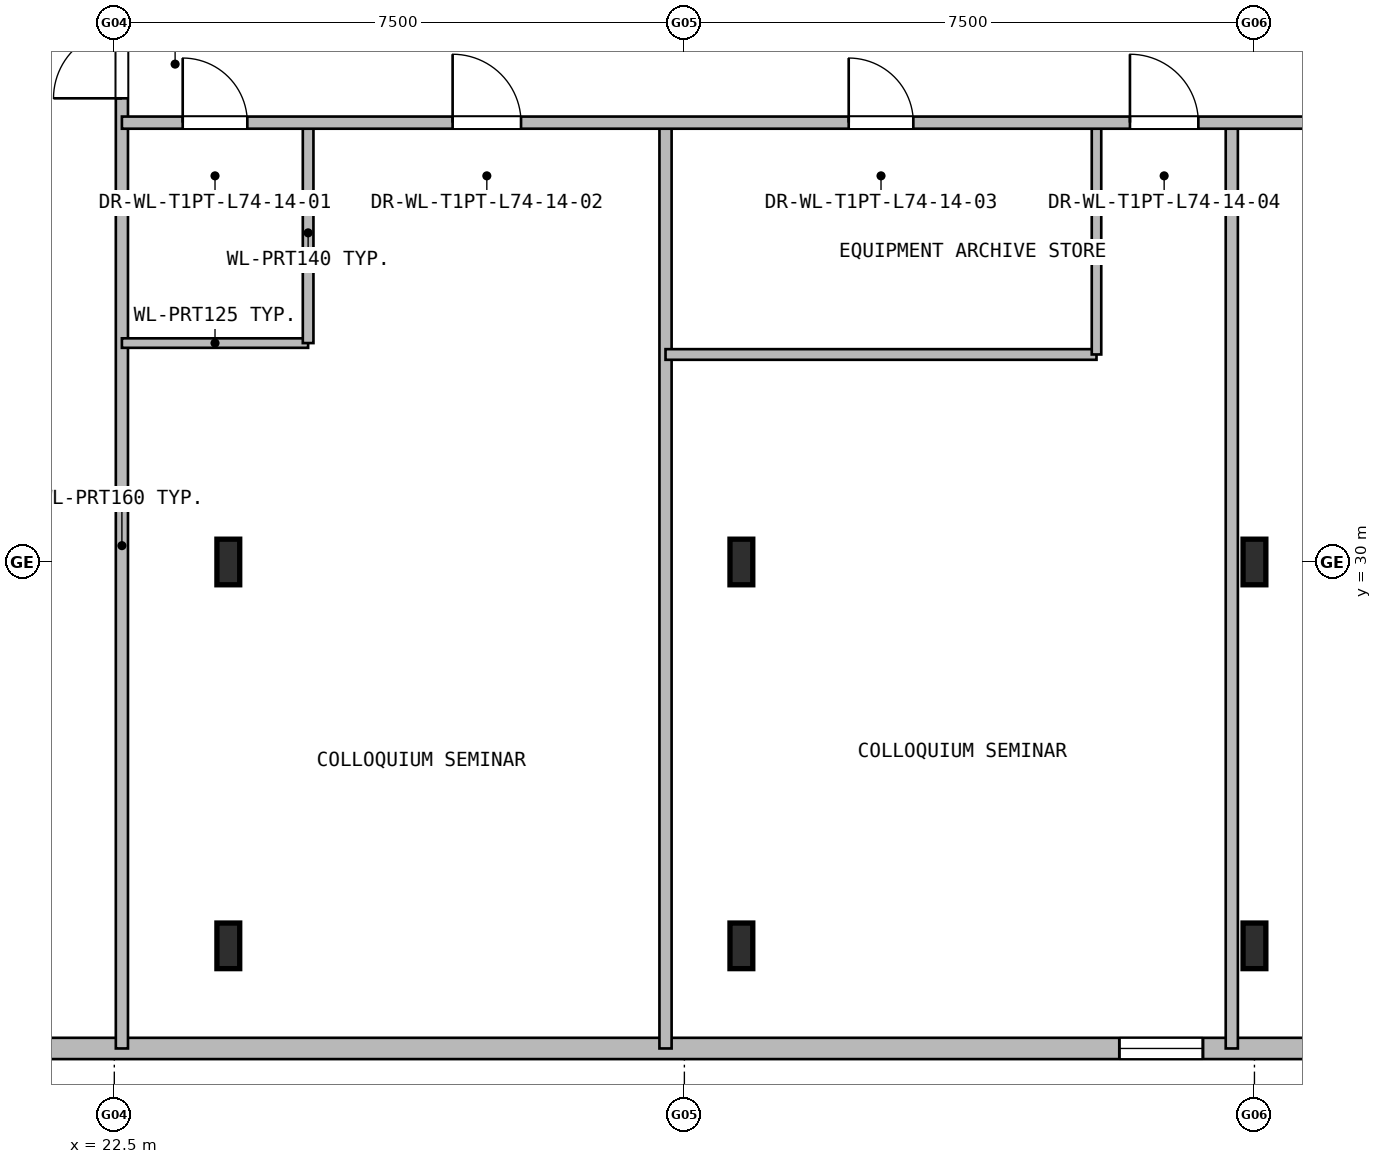
"""IFC4 building model, lengths in metres.
Left out: names, types, materials, properties, quantities, classifications, styles, units other than length and angle.
Written with IfcOpenShell. Run it as: python <this file> out.ifc"""

import sys

from ifc_helpers import new_model, si_unit, direction, frame, frame_2d, origin, origin_2d, place, context, subcontext, project, spatial, rectangle, i_section, extrude, element, fill, save


model = new_model("IFC4")
c1 = context("Model", 3, precision=1e-05, world=origin(), true_north=direction((0.0, 1.0)))
c2 = subcontext(c1, "Body", "Model", "MODEL_VIEW")
j1 = project(units=[si_unit("LENGTHUNIT", "METRE"), si_unit("PLANEANGLEUNIT", "RADIAN")], contexts=[c1])
p1 = place(None, origin())
s1 = spatial("IfcSite", under=j1, at=p1, CompositionType="ELEMENT")
p2 = place(p1, origin())
s2 = spatial("IfcBuilding", under=s1, at=p2, CompositionType="ELEMENT")
p3 = place(p2, frame((0.0, 0.0, 265.8)))
s3 = spatial("IfcBuildingStorey", under=s2, at=p3, CompositionType="ELEMENT", Elevation=265.8)
for number, where, z_axis, x_axis in (
    (1, (24.0, 24.95, 0.0), (0.0, 0.0, 1.0), (1.0, 0.0, 0.0)),
    (2, (24.0, 30.0, 0.0), (0.0, 0.0, 1.0), (1.0, 0.0, 0.0)),
    (3, (30.75, 24.95, 0.0), (0.0, 0.0, 1.0), (1.0, 0.0, 0.0)),
    (4, (30.75, 30.0, 0.0), (0.0, 0.0, 1.0), (1.0, 0.0, 0.0)),
    (5, (37.5, 24.95, 0.0), (0.0, 0.0, 1.0), (1.0, 0.0, 0.0)),
    (6, (37.5, 30.0, 0.0), (0.0, 0.0, 1.0), (1.0, 0.0, 0.0)),
):
    element("IfcColumn", number, at=place(p3, frame(where, z_axis=z_axis, x_axis=x_axis)), inside=s3, PredefinedType="COLUMN", context=c2, shape_type="SweptSolid", body=[
        extrude(i_section(OverallWidth=0.3, OverallDepth=0.6, WebThickness=0.014, FlangeThickness=0.025, at=origin_2d()), origin(), (0.0, 0.0, 1.0), 4.2),
    ])
p4 = place(p3, frame((54.55, 23.6, 0.0), z_axis=(0.0, 0.0, 1.0), x_axis=(-1.0, 0.0, 0.0)))
e7 = element("IfcWall", 7, at=p4, inside=s3, PredefinedType="SOLIDWALL", context=c2, shape_type="SweptSolid", body=[
    extrude(rectangle(XDim=34.1, YDim=0.28, at=frame_2d((17.05, 0.0))), origin(), (0.0, 0.0, 1.0), 3.93),
])
p5 = place(p4, frame((17.728, 0.0, 0.8)))
e8 = element("IfcOpeningElement", 8, at=p5, cuts=e7, PredefinedType="OPENING", context=c2, shape_type="SweptSolid", body=[
    extrude(rectangle(XDim=1.1, YDim=1.5, at=frame_2d((0.55, 0.75))), frame((0.0, 0.15, 0.0), z_axis=(0.0, -1.0, 0.0), x_axis=(1.0, 0.0, 0.0)), (0.0, 0.0, 1.0), 0.3),
])
p6 = place(p4, frame((15.279, 0.0, 0.8)))
e9 = element("IfcOpeningElement", 9, at=p6, cuts=e7, PredefinedType="OPENING", context=c2, shape_type="SweptSolid", body=[
    extrude(rectangle(XDim=1.1, YDim=1.5, at=frame_2d((0.55, 0.75))), frame((0.0, 0.15, 0.0), z_axis=(0.0, -1.0, 0.0), x_axis=(1.0, 0.0, 0.0)), (0.0, 0.0, 1.0), 0.3),
])
p7 = place(p3, frame((22.6, 23.6, 0.0), z_axis=(0.0, 0.0, 1.0), x_axis=(0.0, 1.0, 0.0)))
e10 = element("IfcWall", 10, at=p7, inside=s3, PredefinedType="PARTITIONING", context=c2, shape_type="SweptSolid", body=[
    extrude(rectangle(XDim=14.6, YDim=0.16, at=frame_2d((7.3, 0.0))), origin(), (0.0, 0.0, 1.0), 3.93),
])
p8 = place(p7, frame((12.5, 0.0, 0.0)))
e11 = element("IfcOpeningElement", 11, at=p8, cuts=e10, PredefinedType="OPENING", context=c2, shape_type="SweptSolid", body=[
    extrude(rectangle(XDim=0.9, YDim=2.05, at=frame_2d((0.45, 1.025))), frame((0.0, 0.09, 0.0), z_axis=(0.0, -1.0, 0.0), x_axis=(1.0, 0.0, 0.0)), (0.0, 0.0, 1.0), 0.18),
])
p9 = place(p3, frame((22.6, 32.88, 0.0), z_axis=(0.0, 0.0, 1.0), x_axis=(1.0, 0.0, 0.0)))
e12 = element("IfcWall", 12, at=p9, inside=s3, PredefinedType="PARTITIONING", context=c2, shape_type="SweptSolid", body=[
    extrude(rectangle(XDim=2.45, YDim=0.125, at=frame_2d((1.225, 0.0))), origin(), (0.0, 0.0, 1.0), 3.93),
])
p10 = place(p3, frame((25.05, 32.88, 0.0), z_axis=(0.0, 0.0, 1.0), x_axis=(0.0, 1.0, 0.0)))
e13 = element("IfcWall", 13, at=p10, inside=s3, PredefinedType="PARTITIONING", context=c2, shape_type="SweptSolid", body=[
    extrude(rectangle(XDim=2.9, YDim=0.14, at=frame_2d((1.45, 0.0))), origin(), (0.0, 0.0, 1.0), 3.93),
])
p11 = place(p3, frame((29.752, 23.6, 0.0), z_axis=(0.0, 0.0, 1.0), x_axis=(0.0, 1.0, 0.0)))
e14 = element("IfcWall", 14, at=p11, inside=s3, PredefinedType="PARTITIONING", context=c2, shape_type="SweptSolid", body=[
    extrude(rectangle(XDim=12.18, YDim=0.16, at=frame_2d((6.09, 0.0))), origin(), (0.0, 0.0, 1.0), 3.93),
])
p12 = place(p3, frame((29.752, 32.73, 0.0), z_axis=(0.0, 0.0, 1.0), x_axis=(1.0, 0.0, 0.0)))
e15 = element("IfcWall", 15, at=p12, inside=s3, PredefinedType="PARTITIONING", context=c2, shape_type="SweptSolid", body=[
    extrude(rectangle(XDim=5.67, YDim=0.14, at=frame_2d((2.835, 0.0))), origin(), (0.0, 0.0, 1.0), 3.93),
])
p13 = place(p3, frame((35.422, 32.73, 0.0), z_axis=(0.0, 0.0, 1.0), x_axis=(0.0, 1.0, 0.0)))
e16 = element("IfcWall", 16, at=p13, inside=s3, PredefinedType="PARTITIONING", context=c2, shape_type="SweptSolid", body=[
    extrude(rectangle(XDim=3.05, YDim=0.125, at=frame_2d((1.525, 0.0))), origin(), (0.0, 0.0, 1.0), 3.93),
])
p14 = place(p3, frame((37.202, 23.6, 0.0), z_axis=(0.0, 0.0, 1.0), x_axis=(0.0, 1.0, 0.0)))
e17 = element("IfcWall", 17, at=p14, inside=s3, PredefinedType="PARTITIONING", context=c2, shape_type="SweptSolid", body=[
    extrude(rectangle(XDim=12.18, YDim=0.16, at=frame_2d((6.09, 0.0))), origin(), (0.0, 0.0, 1.0), 3.93),
])
p15 = place(p3, frame((22.6, 35.78, 0.0), z_axis=(0.0, 0.0, 1.0), x_axis=(1.0, 0.0, 0.0)))
e18 = element("IfcWall", 18, at=p15, inside=s3, PredefinedType="PARTITIONING", context=c2, shape_type="SweptSolid", body=[
    extrude(rectangle(XDim=29.8, YDim=0.16, at=frame_2d((14.9, 0.0))), origin(), (0.0, 0.0, 1.0), 3.93),
])
p16 = place(p15, frame((0.8, 0.0, 0.0)))
e19 = element("IfcOpeningElement", 19, at=p16, cuts=e18, PredefinedType="OPENING", context=c2, shape_type="SweptSolid", body=[
    extrude(rectangle(XDim=0.85, YDim=2.05, at=frame_2d((0.425, 1.025))), frame((0.0, 0.09, 0.0), z_axis=(0.0, -1.0, 0.0), x_axis=(1.0, 0.0, 0.0)), (0.0, 0.0, 1.0), 0.18),
])
p17 = place(p15, frame((4.351, 0.0, 0.0)))
e20 = element("IfcOpeningElement", 20, at=p17, cuts=e18, PredefinedType="OPENING", context=c2, shape_type="SweptSolid", body=[
    extrude(rectangle(XDim=0.9, YDim=2.05, at=frame_2d((0.45, 1.025))), frame((0.0, 0.09, 0.0), z_axis=(0.0, -1.0, 0.0), x_axis=(1.0, 0.0, 0.0)), (0.0, 0.0, 1.0), 0.18),
])
p18 = place(p15, frame((9.562, 0.0, 0.0)))
e21 = element("IfcOpeningElement", 21, at=p18, cuts=e18, PredefinedType="OPENING", context=c2, shape_type="SweptSolid", body=[
    extrude(rectangle(XDim=0.85, YDim=2.05, at=frame_2d((0.425, 1.025))), frame((0.0, 0.09, 0.0), z_axis=(0.0, -1.0, 0.0), x_axis=(1.0, 0.0, 0.0)), (0.0, 0.0, 1.0), 0.18),
])
p19 = place(p15, frame((13.262, 0.0, 0.0)))
e22 = element("IfcOpeningElement", 22, at=p19, cuts=e18, PredefinedType="OPENING", context=c2, shape_type="SweptSolid", body=[
    extrude(rectangle(XDim=0.9, YDim=2.05, at=frame_2d((0.45, 1.025))), frame((0.0, 0.09, 0.0), z_axis=(0.0, -1.0, 0.0), x_axis=(1.0, 0.0, 0.0)), (0.0, 0.0, 1.0), 0.18),
])
p20 = place(p15, frame((18.001, 0.0, 0.0)))
e23 = element("IfcOpeningElement", 23, at=p20, cuts=e18, PredefinedType="OPENING", context=c2, shape_type="SweptSolid", body=[
    extrude(rectangle(XDim=0.95, YDim=2.1, at=frame_2d((0.475, 1.05))), frame((0.0, 0.09, 0.0), z_axis=(0.0, -1.0, 0.0), x_axis=(1.0, 0.0, 0.0)), (0.0, 0.0, 1.0), 0.18),
])
p21 = place(p15, frame((26.54, 0.0, 0.0)))
e24 = element("IfcOpeningElement", 24, at=p21, cuts=e18, PredefinedType="OPENING", context=c2, shape_type="SweptSolid", body=[
    extrude(rectangle(XDim=0.85, YDim=2.05, at=frame_2d((0.425, 1.025))), frame((0.0, 0.09, 0.0), z_axis=(0.0, -1.0, 0.0), x_axis=(1.0, 0.0, 0.0)), (0.0, 0.0, 1.0), 0.18),
])
p22 = place(p15, frame((22.79, 0.0, 0.0)))
e25 = element("IfcOpeningElement", 25, at=p22, cuts=e18, PredefinedType="OPENING", context=c2, shape_type="SweptSolid", body=[
    extrude(rectangle(XDim=0.9, YDim=2.05, at=frame_2d((0.45, 1.025))), frame((0.0, 0.09, 0.0), z_axis=(0.0, -1.0, 0.0), x_axis=(1.0, 0.0, 0.0)), (0.0, 0.0, 1.0), 0.18),
])
p23 = place(p5, origin())
e26 = element("IfcWindow", 26, at=p23, inside=s3, PartitioningType="SINGLE_PANEL", PredefinedType="WINDOW", context=c2, shape_type="SweptSolid", body=[
    extrude(rectangle(XDim=1.1, YDim=1.5, at=frame_2d((0.55, 0.75))), frame((0.0, 0.03, 0.0), z_axis=(0.0, -1.0, 0.0), x_axis=(1.0, 0.0, 0.0)), (0.0, 0.0, 1.0), 0.06),
])
fill(e8, e26)
p24 = place(p8, origin())
e27 = element("IfcDoor", 27, at=p24, inside=s3, OperationType="SINGLE_SWING_RIGHT", PredefinedType="DOOR", context=c2, shape_type="SweptSolid", body=[
    extrude(rectangle(XDim=0.9, YDim=2.05, at=frame_2d((0.45, 1.025))), frame((0.0, 0.025, 0.0), z_axis=(0.0, -1.0, 0.0), x_axis=(1.0, 0.0, 0.0)), (0.0, 0.0, 1.0), 0.05),
])
fill(e11, e27)
p25 = place(p16, origin())
e28 = element("IfcDoor", 28, at=p25, inside=s3, OperationType="SINGLE_SWING_RIGHT", PredefinedType="DOOR", context=c2, shape_type="SweptSolid", body=[
    extrude(rectangle(XDim=0.85, YDim=2.05, at=frame_2d((0.425, 1.025))), frame((0.0, 0.025, 0.0), z_axis=(0.0, -1.0, 0.0), x_axis=(1.0, 0.0, 0.0)), (0.0, 0.0, 1.0), 0.05),
])
fill(e19, e28)
p26 = place(p17, origin())
e29 = element("IfcDoor", 29, at=p26, inside=s3, OperationType="SINGLE_SWING_LEFT", PredefinedType="DOOR", context=c2, shape_type="SweptSolid", body=[
    extrude(rectangle(XDim=0.9, YDim=2.05, at=frame_2d((0.45, 1.025))), frame((0.0, 0.025, 0.0), z_axis=(0.0, -1.0, 0.0), x_axis=(1.0, 0.0, 0.0)), (0.0, 0.0, 1.0), 0.05),
])
fill(e20, e29)
p27 = place(p18, origin())
e30 = element("IfcDoor", 30, at=p27, inside=s3, OperationType="SINGLE_SWING_RIGHT", PredefinedType="DOOR", context=c2, shape_type="SweptSolid", body=[
    extrude(rectangle(XDim=0.85, YDim=2.05, at=frame_2d((0.425, 1.025))), frame((0.0, 0.025, 0.0), z_axis=(0.0, -1.0, 0.0), x_axis=(1.0, 0.0, 0.0)), (0.0, 0.0, 1.0), 0.05),
])
fill(e21, e30)
p28 = place(p19, origin())
e31 = element("IfcDoor", 31, at=p28, inside=s3, OperationType="SINGLE_SWING_LEFT", PredefinedType="DOOR", context=c2, shape_type="SweptSolid", body=[
    extrude(rectangle(XDim=0.9, YDim=2.05, at=frame_2d((0.45, 1.025))), frame((0.0, 0.025, 0.0), z_axis=(0.0, -1.0, 0.0), x_axis=(1.0, 0.0, 0.0)), (0.0, 0.0, 1.0), 0.05),
])
fill(e22, e31)
save(model, sys.argv[1])
